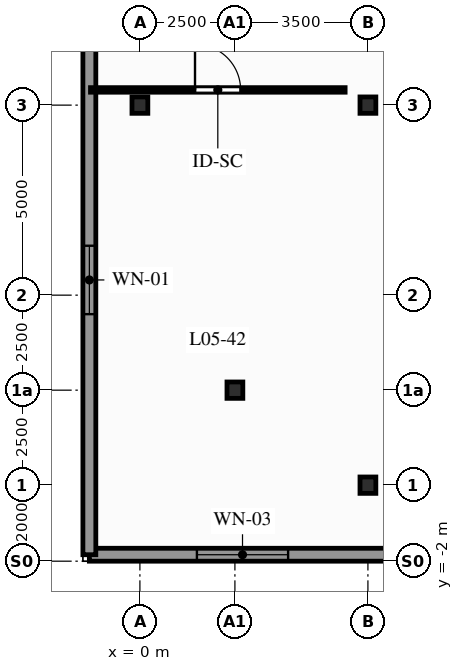
"""IFC4 building model, lengths in metres.
Left out: names, types, materials, properties, quantities, classifications, styles, units other than length and angle.
Written with IfcOpenShell. Run it as: python <this file> out.ifc"""

import sys

from ifc_helpers import new_model, si_unit, direction, frame, frame_2d, origin, origin_2d, place, context, subcontext, project, spatial, rectangle, i_section, extrude, element, fill, save


model = new_model("IFC4")
c1 = context("Model", 3, precision=1e-05, world=origin(), true_north=direction((0.0, 1.0)))
c2 = subcontext(c1, "Body", "Model", "MODEL_VIEW")
j1 = project(units=[si_unit("LENGTHUNIT", "METRE"), si_unit("PLANEANGLEUNIT", "RADIAN")], contexts=[c1])
p1 = place(None, origin())
s1 = spatial("IfcSite", under=j1, at=p1, CompositionType="ELEMENT")
p2 = place(p1, origin())
s2 = spatial("IfcBuilding", under=s1, at=p2, CompositionType="ELEMENT")
p3 = place(p2, frame((0.0, 0.0, 22.5)))
s3 = spatial("IfcBuildingStorey", under=s2, at=p3, CompositionType="ELEMENT", Elevation=22.5)
for number, where, z_axis, x_axis in (
    (1, (0.0, 10.0, 0.0), (0.0, 0.0, 1.0), (1.0, 0.0, 0.0)),
    (2, (2.5, 2.5, 0.0), (0.0, 0.0, 1.0), (1.0, 0.0, 0.0)),
    (3, (6.0, 0.0, 0.0), (0.0, 0.0, 1.0), (1.0, 0.0, 0.0)),
    (4, (6.0, 10.0, 0.0), (0.0, 0.0, 1.0), (1.0, 0.0, 0.0)),
):
    element("IfcColumn", number, at=place(p3, frame(where, z_axis=z_axis, x_axis=x_axis)), inside=s3, PredefinedType="COLUMN", context=c2, shape_type="SweptSolid", body=[
        extrude(i_section(OverallWidth=0.417, OverallDepth=0.431, WebThickness=0.065, FlangeThickness=0.106, FilletRadius=0.015, at=origin_2d()), origin(), (0.0, 0.0, 1.0), 5.5),
    ])
p4 = place(p3, frame((-1.33, -1.83, 0.0), z_axis=(0.0, 0.0, 1.0), x_axis=(1.0, 0.0, 0.0)))
e5 = element("IfcWall", 5, at=p4, inside=s3, PredefinedType="STANDARD", context=c2, shape_type="SweptSolid", body=[
    extrude(rectangle(XDim=62.66, YDim=0.34, at=frame_2d((31.33, 0.0))), origin(), (0.0, 0.0, 1.0), 5.23),
])
p5 = place(p4, frame((2.83, 0.0, 0.9)))
e6 = element("IfcOpeningElement", 6, at=p5, cuts=e5, PredefinedType="OPENING", context=c2, shape_type="SweptSolid", body=[
    extrude(rectangle(XDim=2.4, YDim=2.15, at=frame_2d((1.2, 1.075))), frame((0.0, 0.18, 0.0), z_axis=(0.0, -1.0, 0.0), x_axis=(1.0, 0.0, 0.0)), (0.0, 0.0, 1.0), 0.36),
])
p6 = place(p4, frame((8.33, 0.0, 0.9)))
e7 = element("IfcOpeningElement", 7, at=p6, cuts=e5, PredefinedType="OPENING", context=c2, shape_type="SweptSolid", body=[
    extrude(rectangle(XDim=2.4, YDim=2.15, at=frame_2d((1.2, 1.075))), frame((0.0, 0.18, 0.0), z_axis=(0.0, -1.0, 0.0), x_axis=(1.0, 0.0, 0.0)), (0.0, 0.0, 1.0), 0.36),
])
p7 = place(p4, frame((52.33, 0.0, 0.9)))
e8 = element("IfcOpeningElement", 8, at=p7, cuts=e5, PredefinedType="OPENING", context=c2, shape_type="SweptSolid", body=[
    extrude(rectangle(XDim=2.4, YDim=2.15, at=frame_2d((1.2, 1.075))), frame((0.0, 0.18, 0.0), z_axis=(0.0, -1.0, 0.0), x_axis=(1.0, 0.0, 0.0)), (0.0, 0.0, 1.0), 0.36),
])
p8 = place(p4, frame((57.83, 0.0, 0.9)))
e9 = element("IfcOpeningElement", 9, at=p8, cuts=e5, PredefinedType="OPENING", context=c2, shape_type="SweptSolid", body=[
    extrude(rectangle(XDim=2.4, YDim=2.15, at=frame_2d((1.2, 1.075))), frame((0.0, 0.18, 0.0), z_axis=(0.0, -1.0, 0.0), x_axis=(1.0, 0.0, 0.0)), (0.0, 0.0, 1.0), 0.36),
])
p9 = place(p3, frame((-1.33, 34.6, 0.0), z_axis=(0.0, 0.0, 1.0), x_axis=(0.0, -1.0, 0.0)))
e10 = element("IfcWall", 10, at=p9, inside=s3, PredefinedType="STANDARD", context=c2, shape_type="SweptSolid", body=[
    extrude(rectangle(XDim=36.43, YDim=0.34, at=frame_2d((18.215, 0.0))), origin(), (0.0, 0.0, 1.0), 5.23),
])
p10 = place(p9, frame((28.3, 0.0, 0.9)))
e11 = element("IfcOpeningElement", 11, at=p10, cuts=e10, PredefinedType="OPENING", context=c2, shape_type="SweptSolid", body=[
    extrude(rectangle(XDim=1.8, YDim=1.95, at=frame_2d((0.9, 0.975))), frame((0.0, 0.18, 0.0), z_axis=(0.0, -1.0, 0.0), x_axis=(1.0, 0.0, 0.0)), (0.0, 0.0, 1.0), 0.36),
])
p11 = place(p9, frame((19.3, 0.0, 0.9)))
e12 = element("IfcOpeningElement", 12, at=p11, cuts=e10, PredefinedType="OPENING", context=c2, shape_type="SweptSolid", body=[
    extrude(rectangle(XDim=1.8, YDim=1.95, at=frame_2d((0.9, 0.975))), frame((0.0, 0.18, 0.0), z_axis=(0.0, -1.0, 0.0), x_axis=(1.0, 0.0, 0.0)), (0.0, 0.0, 1.0), 0.36),
])
p12 = place(p9, frame((13.6, 0.0, 0.9)))
e13 = element("IfcOpeningElement", 13, at=p12, cuts=e10, PredefinedType="OPENING", context=c2, shape_type="SweptSolid", body=[
    extrude(rectangle(XDim=1.8, YDim=1.95, at=frame_2d((0.9, 0.975))), frame((0.0, 0.18, 0.0), z_axis=(0.0, -1.0, 0.0), x_axis=(1.0, 0.0, 0.0)), (0.0, 0.0, 1.0), 0.36),
])
p13 = place(p9, frame((6.0, 0.0, 0.9)))
e14 = element("IfcOpeningElement", 14, at=p13, cuts=e10, PredefinedType="OPENING", context=c2, shape_type="SweptSolid", body=[
    extrude(rectangle(XDim=1.8, YDim=1.95, at=frame_2d((0.9, 0.975))), frame((0.0, 0.18, 0.0), z_axis=(0.0, -1.0, 0.0), x_axis=(1.0, 0.0, 0.0)), (0.0, 0.0, 1.0), 0.36),
])
p14 = place(p3, frame((-1.3, 10.4, 0.0), z_axis=(0.0, 0.0, 1.0), x_axis=(1.0, 0.0, 0.0)))
e15 = element("IfcWall", 15, at=p14, inside=s3, PredefinedType="PARTITIONING", context=c2, shape_type="SweptSolid", body=[
    extrude(rectangle(XDim=6.7, YDim=0.12, at=frame_2d((3.35, 0.0))), origin(), (0.0, 0.0, 1.0), 4.666),
])
p15 = place(p14, frame((2.75, 0.0, 0.0)))
e16 = element("IfcOpeningElement", 16, at=p15, cuts=e15, PredefinedType="OPENING", context=c2, shape_type="SweptSolid", body=[
    extrude(rectangle(XDim=1.2, YDim=2.08, at=frame_2d((0.6, 1.04))), frame((0.0, 0.07, 0.0), z_axis=(0.0, -1.0, 0.0), x_axis=(1.0, 0.0, 0.0)), (0.0, 0.0, 1.0), 0.14),
])
p16 = place(p5, origin())
e17 = element("IfcWindow", 17, at=p16, inside=s3, PartitioningType="SINGLE_PANEL", PredefinedType="WINDOW", context=c2, shape_type="SweptSolid", body=[
    extrude(rectangle(XDim=2.4, YDim=2.15, at=frame_2d((1.2, 1.075))), frame((0.0, 0.03, 0.0), z_axis=(0.0, -1.0, 0.0), x_axis=(1.0, 0.0, 0.0)), (0.0, 0.0, 1.0), 0.06),
])
fill(e6, e17)
p17 = place(p10, origin())
e18 = element("IfcWindow", 18, at=p17, inside=s3, PartitioningType="SINGLE_PANEL", PredefinedType="WINDOW", context=c2, shape_type="SweptSolid", body=[
    extrude(rectangle(XDim=1.8, YDim=1.95, at=frame_2d((0.9, 0.975))), frame((0.0, 0.03, 0.0), z_axis=(0.0, -1.0, 0.0), x_axis=(1.0, 0.0, 0.0)), (0.0, 0.0, 1.0), 0.06),
])
fill(e11, e18)
p18 = place(p15, origin())
e19 = element("IfcDoor", 19, at=p18, inside=s3, OperationType="SINGLE_SWING_LEFT", PredefinedType="DOOR", context=c2, shape_type="SweptSolid", body=[
    extrude(rectangle(XDim=1.2, YDim=2.08, at=frame_2d((0.6, 1.04))), frame((0.0, 0.025, 0.0), z_axis=(0.0, -1.0, 0.0), x_axis=(1.0, 0.0, 0.0)), (0.0, 0.0, 1.0), 0.05),
])
fill(e16, e19)
save(model, sys.argv[1])
